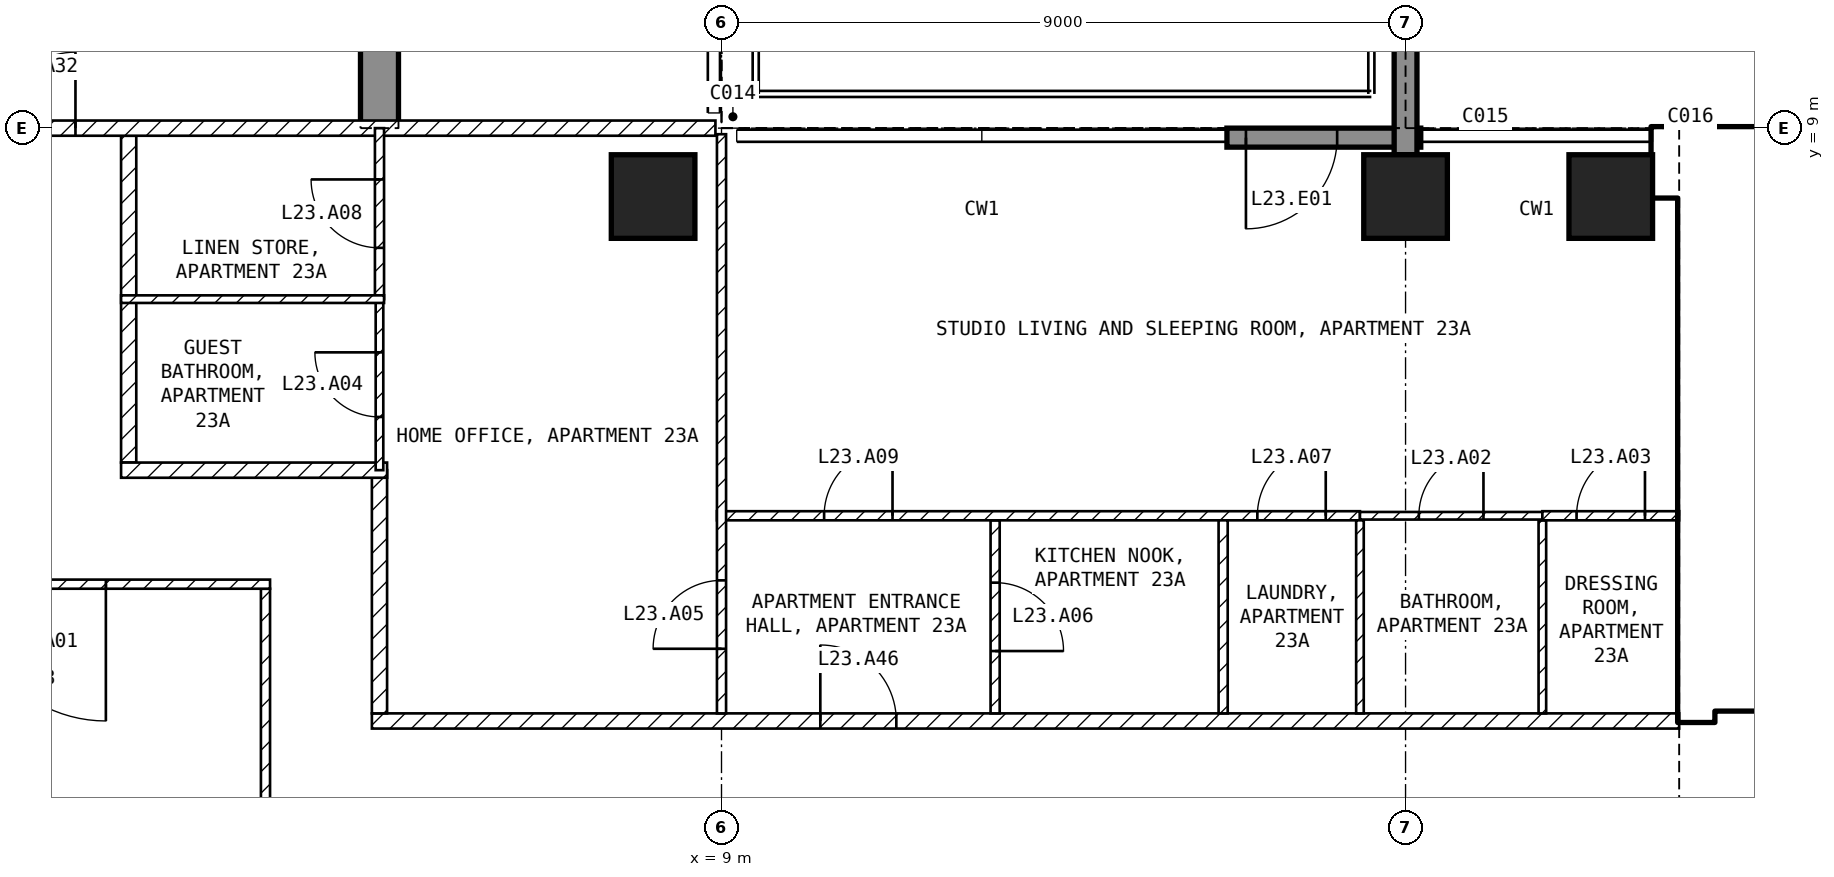
"""IFC4 building model, lengths in metres.
Left out: names, types, materials, properties, quantities, classifications, styles, units other than length and angle.
Written with IfcOpenShell. Run it as: python <this file> out.ifc"""

import sys

from ifc_helpers import new_model, si_unit, direction, frame, frame_2d, origin, origin_2d, place, context, subcontext, project, spatial, polyline, rectangle, outline, extrude, element, fill, save


model = new_model("IFC4")
c1 = context("Model", 3, precision=1e-05, world=origin(), true_north=direction((0.0, 1.0)))
c2 = subcontext(c1, "Body", "Model", "MODEL_VIEW")
j1 = project(units=[si_unit("LENGTHUNIT", "METRE"), si_unit("PLANEANGLEUNIT", "RADIAN")], contexts=[c1])
p1 = place(None, origin())
s1 = spatial("IfcSite", under=j1, at=p1, CompositionType="ELEMENT")
p2 = place(p1, origin())
s2 = spatial("IfcBuilding", under=s1, at=p2, CompositionType="ELEMENT")
p3 = place(p2, frame((0.0, 0.0, 102.4)))
s3 = spatial("IfcBuildingStorey", under=s2, at=p3, CompositionType="ELEMENT", Elevation=102.4)
for number, where, z_axis, x_axis in (
    (1, (8.1, 8.1, -0.25), (0.0, 0.0, 1.0), (1.0, 0.0, 0.0)),
    (2, (18.0, 8.1, -0.25), (0.0, 0.0, 1.0), (1.0, 0.0, 0.0)),
    (3, (20.7, 8.1, -0.25), (0.0, 0.0, 1.0), (1.0, 0.0, 0.0)),
):
    element("IfcColumn", number, at=place(p3, frame(where, z_axis=z_axis, x_axis=x_axis)), inside=s3, PredefinedType="COLUMN", context=c2, shape_type="SweptSolid", body=[
        extrude(rectangle(XDim=1.1, YDim=1.1, at=origin_2d()), origin(), (0.0, 0.0, 1.0), 3.5),
    ])
p4 = place(p3, frame((4.25, 9.0, -0.25), z_axis=(1.0, 0.0, 0.0), x_axis=(0.0, 1.0, 0.0)))
e4 = element("IfcWall", 4, at=p4, inside=s3, PredefinedType="SHEAR", context=c2, shape_type="SweptSolid", body=[
    extrude(outline(polyline([(0.0, 0.0), (2.1, 0.0), (2.1, 2.65), (4.5, 2.65), (4.5, 0.0), (9.9, 0.0), (9.9, 2.65), (12.3, 2.65), (12.3, 0.0), (16.55, 0.0), (16.55, 3.5), (0.0, 3.5), (0.0, 0.0)])), origin(), (0.0, 0.0, 1.0), 0.5),
])
p5 = place(p3, frame((18.2, 8.875, 0.0), z_axis=(0.0, 0.0, 1.0), x_axis=(-1.0, 0.0, 0.0)))
e5 = element("IfcWall", 5, at=p5, inside=s3, PredefinedType="SOLIDWALL", context=c2, shape_type="SweptSolid", body=[
    extrude(rectangle(XDim=2.55, YDim=0.25, at=frame_2d((1.275, 0.0))), origin(), (0.0, 0.0, 1.0), 3.25),
])
p6 = place(p5, frame((1.1, 0.0, 0.0)))
e6 = element("IfcOpeningElement", 6, at=p6, cuts=e5, PredefinedType="OPENING", context=c2, shape_type="SweptSolid", body=[
    extrude(rectangle(XDim=1.2, YDim=2.4, at=frame_2d((0.6, 1.2))), frame((0.0, 0.135, 0.0), z_axis=(0.0, -1.0, 0.0), x_axis=(1.0, 0.0, 0.0)), (0.0, 0.0, 1.0), 0.27),
])
p7 = place(p3, frame((18.0, 8.65, 0.0), z_axis=(0.0, 0.0, 1.0), x_axis=(0.0, 1.0, 0.0)))
e7 = element("IfcWall", 7, at=p7, inside=s3, PredefinedType="SOLIDWALL", context=c2, shape_type="SweptSolid", body=[
    extrude(rectangle(XDim=3.09, YDim=0.3, at=frame_2d((1.545, 0.0))), origin(), (0.0, 0.0, 1.0), 3.25),
])
p8 = place(p3, frame((21.25, 8.55, 0.0), z_axis=(0.0, 0.0, 1.0), x_axis=(1.0, 0.0, 0.0)))
e8 = element("IfcWall", 8, at=p8, inside=s3, PredefinedType="SHEAR", context=c2, shape_type="SweptSolid", body=[
    extrude(rectangle(XDim=8.2, YDim=0.9, at=frame_2d((4.1, 0.0))), origin(), (0.0, 0.0, 1.0), 3.25),
])
p9 = place(p3, frame((21.825, 1.2, 0.0), z_axis=(0.0, 0.0, 1.0), x_axis=(0.0, 1.0, 0.0)))
e9 = element("IfcWall", 9, at=p9, inside=s3, PredefinedType="SHEAR", context=c2, shape_type="SweptSolid", body=[
    extrude(rectangle(XDim=6.9, YDim=0.45, at=frame_2d((3.45, 0.0))), origin(), (0.0, 0.0, 1.0), 3.25),
])
p10 = place(p3, frame((22.05, 1.45, 0.0), z_axis=(0.0, 0.0, 1.0), x_axis=(1.0, 0.0, 0.0)))
e10 = element("IfcWall", 10, at=p10, inside=s3, PredefinedType="SOLIDWALL", context=c2, shape_type="SweptSolid", body=[
    extrude(rectangle(XDim=11.0, YDim=0.2, at=frame_2d((5.5, 0.0))), origin(), (0.0, 0.0, 1.0), 3.25),
])
p11 = place(p10, frame((0.75, 0.0, 0.0)))
e11 = element("IfcOpeningElement", 11, at=p11, cuts=e10, PredefinedType="OPENING", context=c2, shape_type="SweptSolid", body=[
    extrude(rectangle(XDim=1.0, YDim=2.1, at=frame_2d((0.5, 1.05))), frame((0.0, 0.11, 0.0), z_axis=(0.0, -1.0, 0.0), x_axis=(1.0, 0.0, 0.0)), (0.0, 0.0, 1.0), 0.22),
])
p12 = place(p10, frame((3.25, 0.0, 0.0)))
e12 = element("IfcOpeningElement", 12, at=p12, cuts=e10, PredefinedType="OPENING", context=c2, shape_type="SweptSolid", body=[
    extrude(rectangle(XDim=1.0, YDim=2.1, at=frame_2d((0.5, 1.05))), frame((0.0, 0.11, 0.0), z_axis=(0.0, -1.0, 0.0), x_axis=(1.0, 0.0, 0.0)), (0.0, 0.0, 1.0), 0.22),
])
p13 = place(p10, frame((9.075, 0.0, 0.0)))
e13 = element("IfcOpeningElement", 13, at=p13, cuts=e10, PredefinedType="OPENING", context=c2, shape_type="SweptSolid", body=[
    extrude(rectangle(XDim=0.9, YDim=2.1, at=frame_2d((0.45, 1.05))), frame((0.0, 0.11, 0.0), z_axis=(0.0, -1.0, 0.0), x_axis=(1.0, 0.0, 0.0)), (0.0, 0.0, 1.0), 0.22),
])
p14 = place(p3, frame((22.05, 5.15, 0.0), z_axis=(0.0, 0.0, 1.0), x_axis=(1.0, 0.0, 0.0)))
e14 = element("IfcWall", 14, at=p14, inside=s3, PredefinedType="SOLIDWALL", context=c2, shape_type="SweptSolid", body=[
    extrude(rectangle(XDim=6.3, YDim=0.2, at=frame_2d((3.15, 0.0))), origin(), (0.0, 0.0, 1.0), 3.25),
])
p15 = place(p14, frame((0.2, 0.0, 0.0)))
e15 = element("IfcOpeningElement", 15, at=p15, cuts=e14, PredefinedType="OPENING", context=c2, shape_type="SweptSolid", body=[
    extrude(rectangle(XDim=1.0, YDim=2.1, at=frame_2d((0.5, 1.05))), frame((0.0, 0.11, 0.0), z_axis=(0.0, -1.0, 0.0), x_axis=(1.0, 0.0, 0.0)), (0.0, 0.0, 1.0), 0.22),
])
p16 = place(p3, frame((3.0, -2.94, 0.0), z_axis=(0.0, 0.0, 1.0), x_axis=(0.0, 1.0, 0.0)))
e16 = element("IfcWall", 16, at=p16, inside=s3, PredefinedType="PARTITIONING", context=c2, shape_type="SweptSolid", body=[
    extrude(rectangle(XDim=5.88, YDim=0.12, at=frame_2d((2.94, 0.0))), origin(), (0.0, 0.0, 1.0), 3.25),
])
p17 = place(p3, frame((3.06, 3.0, 0.0), z_axis=(0.0, 0.0, 1.0), x_axis=(-1.0, 0.0, 0.0)))
e17 = element("IfcWall", 17, at=p17, inside=s3, PredefinedType="PARTITIONING", context=c2, shape_type="SweptSolid", body=[
    extrude(rectangle(XDim=6.12, YDim=0.12, at=frame_2d((3.06, 0.0))), origin(), (0.0, 0.0, 1.0), 3.25),
])
p18 = place(p17, frame((2.16, 0.0, 0.0)))
e18 = element("IfcOpeningElement", 18, at=p18, cuts=e17, PredefinedType="OPENING", context=c2, shape_type="SweptSolid", body=[
    extrude(rectangle(XDim=1.8, YDim=2.1, at=frame_2d((0.9, 1.05))), frame((0.0, 0.07, 0.0), z_axis=(0.0, -1.0, 0.0), x_axis=(1.0, 0.0, 0.0)), (0.0, 0.0, 1.0), 0.14),
])
p19 = place(p3, frame((4.4, 1.2, 0.0), z_axis=(0.0, 0.0, 1.0), x_axis=(1.0, 0.0, 0.0)))
e19 = element("IfcWall", 19, at=p19, inside=s3, PredefinedType="PARTITIONING", context=c2, shape_type="SweptSolid", body=[
    extrude(rectangle(XDim=17.2, YDim=0.2, at=frame_2d((8.6, 0.0))), origin(), (0.0, 0.0, 1.0), 3.25),
])
p20 = place(p19, frame((5.9, 0.0, 0.0)))
e20 = element("IfcOpeningElement", 20, at=p20, cuts=e19, PredefinedType="OPENING", context=c2, shape_type="SweptSolid", body=[
    extrude(rectangle(XDim=1.0, YDim=2.1, at=frame_2d((0.5, 1.05))), frame((0.0, 0.11, 0.0), z_axis=(0.0, -1.0, 0.0), x_axis=(1.0, 0.0, 0.0)), (0.0, 0.0, 1.0), 0.22),
])
p21 = place(p3, frame((4.5, 4.5, 0.0), z_axis=(0.0, 0.0, 1.0), x_axis=(0.0, -1.0, 0.0)))
e21 = element("IfcWall", 21, at=p21, inside=s3, PredefinedType="PARTITIONING", context=c2, shape_type="SweptSolid", body=[
    extrude(rectangle(XDim=3.2, YDim=0.2, at=frame_2d((1.6, 0.0))), origin(), (0.0, 0.0, 1.0), 3.25),
])
p22 = place(p3, frame((1.2, 8.9, 0.0), z_axis=(0.0, 0.0, 1.0), x_axis=(0.0, -1.0, 0.0)))
e22 = element("IfcWall", 22, at=p22, inside=s3, PredefinedType="PARTITIONING", context=c2, shape_type="SweptSolid", body=[
    extrude(rectangle(XDim=4.3, YDim=0.2, at=frame_2d((2.15, 0.0))), origin(), (0.0, 0.0, 1.0), 3.25),
])
p23 = place(p3, frame((1.1, 4.5, 0.0), z_axis=(0.0, 0.0, 1.0), x_axis=(1.0, 0.0, 0.0)))
e23 = element("IfcWall", 23, at=p23, inside=s3, PredefinedType="PARTITIONING", context=c2, shape_type="SweptSolid", body=[
    extrude(rectangle(XDim=3.5, YDim=0.2, at=frame_2d((1.75, 0.0))), origin(), (0.0, 0.0, 1.0), 3.25),
])
p24 = place(p3, frame((-8.92, 9.0, 0.0), z_axis=(0.0, 0.0, 1.0), x_axis=(1.0, 0.0, 0.0)))
e24 = element("IfcWall", 24, at=p24, inside=s3, PredefinedType="PARTITIONING", context=c2, shape_type="SweptSolid", body=[
    extrude(rectangle(XDim=17.84, YDim=0.2, at=frame_2d((8.92, 0.0))), origin(), (0.0, 0.0, 1.0), 3.25),
])
p25 = place(p24, frame((8.42, 0.0, 0.0)))
e25 = element("IfcOpeningElement", 25, at=p25, cuts=e24, PredefinedType="OPENING", context=c2, shape_type="SweptSolid", body=[
    extrude(rectangle(XDim=1.0, YDim=2.1, at=frame_2d((0.5, 1.05))), frame((0.0, 0.11, 0.0), z_axis=(0.0, -1.0, 0.0), x_axis=(1.0, 0.0, 0.0)), (0.0, 0.0, 1.0), 0.22),
])
p26 = place(p3, frame((12.6, 3.84, 0.0), z_axis=(0.0, 0.0, 1.0), x_axis=(0.0, -1.0, 0.0)))
e26 = element("IfcWall", 26, at=p26, inside=s3, PredefinedType="PARTITIONING", context=c2, shape_type="SweptSolid", body=[
    extrude(rectangle(XDim=2.54, YDim=0.12, at=frame_2d((1.27, 0.0))), origin(), (0.0, 0.0, 1.0), 3.25),
])
p27 = place(p26, frame((0.82, 0.0, 0.0)))
e27 = element("IfcOpeningElement", 27, at=p27, cuts=e26, PredefinedType="OPENING", context=c2, shape_type="SweptSolid", body=[
    extrude(rectangle(XDim=0.9, YDim=2.1, at=frame_2d((0.45, 1.05))), frame((0.0, 0.07, 0.0), z_axis=(0.0, -1.0, 0.0), x_axis=(1.0, 0.0, 0.0)), (0.0, 0.0, 1.0), 0.14),
])
p28 = place(p3, frame((8.94, 3.9, 0.0), z_axis=(0.0, 0.0, 1.0), x_axis=(1.0, 0.0, 0.0)))
e28 = element("IfcWall", 28, at=p28, inside=s3, PredefinedType="PARTITIONING", context=c2, shape_type="SweptSolid", body=[
    extrude(rectangle(XDim=8.46, YDim=0.12, at=frame_2d((4.23, 0.0))), origin(), (0.0, 0.0, 1.0), 3.25),
])
p29 = place(p28, frame((7.11, 0.0, 0.0)))
e29 = element("IfcOpeningElement", 29, at=p29, cuts=e28, PredefinedType="OPENING", context=c2, shape_type="SweptSolid", body=[
    extrude(rectangle(XDim=0.9, YDim=2.1, at=frame_2d((0.45, 1.05))), frame((0.0, 0.07, 0.0), z_axis=(0.0, -1.0, 0.0), x_axis=(1.0, 0.0, 0.0)), (0.0, 0.0, 1.0), 0.14),
])
p30 = place(p28, frame((1.41, 0.0, 0.0)))
e30 = element("IfcOpeningElement", 30, at=p30, cuts=e28, PredefinedType="OPENING", context=c2, shape_type="SweptSolid", body=[
    extrude(rectangle(XDim=0.9, YDim=2.1, at=frame_2d((0.45, 1.05))), frame((0.0, 0.07, 0.0), z_axis=(0.0, -1.0, 0.0), x_axis=(1.0, 0.0, 0.0)), (0.0, 0.0, 1.0), 0.14),
])
p31 = place(p3, frame((9.0, 1.3, 0.0), z_axis=(0.0, 0.0, 1.0), x_axis=(0.0, 1.0, 0.0)))
e31 = element("IfcWall", 31, at=p31, inside=s3, PredefinedType="PARTITIONING", context=c2, shape_type="SweptSolid", body=[
    extrude(rectangle(XDim=7.62, YDim=0.12, at=frame_2d((3.81, 0.0))), origin(), (0.0, 0.0, 1.0), 3.25),
])
p32 = place(p31, frame((0.85, 0.0, 0.0)))
e32 = element("IfcOpeningElement", 32, at=p32, cuts=e31, PredefinedType="OPENING", context=c2, shape_type="SweptSolid", body=[
    extrude(rectangle(XDim=0.9, YDim=2.1, at=frame_2d((0.45, 1.05))), frame((0.0, 0.07, 0.0), z_axis=(0.0, -1.0, 0.0), x_axis=(1.0, 0.0, 0.0)), (0.0, 0.0, 1.0), 0.14),
])
p33 = place(p3, frame((15.6, 3.84, 0.0), z_axis=(0.0, 0.0, 1.0), x_axis=(0.0, -1.0, 0.0)))
e33 = element("IfcWall", 33, at=p33, inside=s3, PredefinedType="PARTITIONING", context=c2, shape_type="SweptSolid", body=[
    extrude(rectangle(XDim=2.54, YDim=0.12, at=frame_2d((1.27, 0.0))), origin(), (0.0, 0.0, 1.0), 3.25),
])
for number, where, z_axis, x_axis in (
    (34, (17.4, 3.84, 0.0), (0.0, 0.0, 1.0), (0.0, -1.0, 0.0)),
    (35, (19.8, 3.84, 0.0), (0.0, 0.0, 1.0), (0.0, -1.0, 0.0)),
):
    element("IfcWall", number, at=place(p3, frame(where, z_axis=z_axis, x_axis=x_axis)), inside=s3, PredefinedType="PARTITIONING", context=c2, shape_type="SweptSolid", body=[
        extrude(rectangle(XDim=2.54, YDim=0.1, at=frame_2d((1.27, 0.0))), origin(), (0.0, 0.0, 1.0), 3.25),
    ])
p34 = place(p3, frame((17.4, 3.9, 0.0), z_axis=(0.0, 0.0, 1.0), x_axis=(1.0, 0.0, 0.0)))
e36 = element("IfcWall", 36, at=p34, inside=s3, PredefinedType="PARTITIONING", context=c2, shape_type="SweptSolid", body=[
    extrude(rectangle(XDim=2.4, YDim=0.1, at=frame_2d((1.2, 0.0))), origin(), (0.0, 0.0, 1.0), 3.25),
])
p35 = place(p34, frame((0.775, 0.0, 0.0)))
e37 = element("IfcOpeningElement", 37, at=p35, cuts=e36, PredefinedType="OPENING", context=c2, shape_type="SweptSolid", body=[
    extrude(rectangle(XDim=0.85, YDim=2.1, at=frame_2d((0.425, 1.05))), frame((0.0, 0.06, 0.0), z_axis=(0.0, -1.0, 0.0), x_axis=(1.0, 0.0, 0.0)), (0.0, 0.0, 1.0), 0.12),
])
p36 = place(p3, frame((19.8, 3.9, 0.0), z_axis=(0.0, 0.0, 1.0), x_axis=(1.0, 0.0, 0.0)))
e38 = element("IfcWall", 38, at=p36, inside=s3, PredefinedType="PARTITIONING", context=c2, shape_type="SweptSolid", body=[
    extrude(rectangle(XDim=1.8, YDim=0.12, at=frame_2d((0.9, 0.0))), origin(), (0.0, 0.0, 1.0), 3.25),
])
p37 = place(p36, frame((0.45, 0.0, 0.0)))
e39 = element("IfcOpeningElement", 39, at=p37, cuts=e38, PredefinedType="OPENING", context=c2, shape_type="SweptSolid", body=[
    extrude(rectangle(XDim=0.9, YDim=2.1, at=frame_2d((0.45, 1.05))), frame((0.0, 0.07, 0.0), z_axis=(0.0, -1.0, 0.0), x_axis=(1.0, 0.0, 0.0)), (0.0, 0.0, 1.0), 0.14),
])
p38 = place(p3, frame((4.5, 4.5, 0.0), z_axis=(0.0, 0.0, 1.0), x_axis=(0.0, 1.0, 0.0)))
e40 = element("IfcWall", 40, at=p38, inside=s3, PredefinedType="PARTITIONING", context=c2, shape_type="SweptSolid", body=[
    extrude(rectangle(XDim=2.25, YDim=0.1, at=frame_2d((1.125, 0.0))), origin(), (0.0, 0.0, 1.0), 3.25),
])
p39 = place(p38, frame((0.7, 0.0, 0.0)))
e41 = element("IfcOpeningElement", 41, at=p39, cuts=e40, PredefinedType="OPENING", context=c2, shape_type="SweptSolid", body=[
    extrude(rectangle(XDim=0.85, YDim=2.1, at=frame_2d((0.425, 1.05))), frame((0.0, 0.06, 0.0), z_axis=(0.0, -1.0, 0.0), x_axis=(1.0, 0.0, 0.0)), (0.0, 0.0, 1.0), 0.12),
])
p40 = place(p3, frame((4.5, 6.75, 0.0), z_axis=(0.0, 0.0, 1.0), x_axis=(0.0, 1.0, 0.0)))
e42 = element("IfcWall", 42, at=p40, inside=s3, PredefinedType="PARTITIONING", context=c2, shape_type="SweptSolid", body=[
    extrude(rectangle(XDim=2.25, YDim=0.12, at=frame_2d((1.125, 0.0))), origin(), (0.0, 0.0, 1.0), 3.25),
])
p41 = place(p40, frame((0.675, 0.0, 0.0)))
e43 = element("IfcOpeningElement", 43, at=p41, cuts=e42, PredefinedType="OPENING", context=c2, shape_type="SweptSolid", body=[
    extrude(rectangle(XDim=0.9, YDim=2.1, at=frame_2d((0.45, 1.05))), frame((0.0, 0.07, 0.0), z_axis=(0.0, -1.0, 0.0), x_axis=(1.0, 0.0, 0.0)), (0.0, 0.0, 1.0), 0.14),
])
p42 = place(p3, frame((1.1, 6.75, 0.0), z_axis=(0.0, 0.0, 1.0), x_axis=(1.0, 0.0, 0.0)))
e44 = element("IfcWall", 44, at=p42, inside=s3, PredefinedType="PARTITIONING", context=c2, shape_type="SweptSolid", body=[
    extrude(rectangle(XDim=3.46, YDim=0.1, at=frame_2d((1.73, 0.0))), origin(), (0.0, 0.0, 1.0), 3.25),
])
p43 = place(p6, origin())
e45 = element("IfcDoor", 45, at=p43, inside=s3, OperationType="SINGLE_SWING_RIGHT", PredefinedType="DOOR", context=c2, shape_type="SweptSolid", body=[
    extrude(rectangle(XDim=1.2, YDim=2.4, at=frame_2d((0.6, 1.2))), frame((0.0, 0.025, 0.0), z_axis=(0.0, -1.0, 0.0), x_axis=(1.0, 0.0, 0.0)), (0.0, 0.0, 1.0), 0.05),
])
fill(e6, e45)
p44 = place(p15, origin())
e46 = element("IfcDoor", 46, at=p44, inside=s3, OperationType="SINGLE_SWING_LEFT", PredefinedType="DOOR", context=c2, shape_type="SweptSolid", body=[
    extrude(rectangle(XDim=1.0, YDim=2.1, at=frame_2d((0.5, 1.05))), frame((0.0, 0.025, 0.0), z_axis=(0.0, -1.0, 0.0), x_axis=(1.0, 0.0, 0.0)), (0.0, 0.0, 1.0), 0.05),
])
fill(e15, e46)
p45 = place(p18, origin())
e47 = element("IfcDoor", 47, at=p45, inside=s3, OperationType="SINGLE_SWING_LEFT", PredefinedType="DOOR", context=c2, shape_type="SweptSolid", body=[
    extrude(rectangle(XDim=1.8, YDim=2.1, at=frame_2d((0.9, 1.05))), frame((0.0, 0.025, 0.0), z_axis=(0.0, -1.0, 0.0), x_axis=(1.0, 0.0, 0.0)), (0.0, 0.0, 1.0), 0.05),
])
fill(e18, e47)
p46 = place(p35, origin())
e48 = element("IfcDoor", 48, at=p46, inside=s3, OperationType="SINGLE_SWING_RIGHT", PredefinedType="DOOR", context=c2, shape_type="SweptSolid", body=[
    extrude(rectangle(XDim=0.85, YDim=2.1, at=frame_2d((0.425, 1.05))), frame((0.0, 0.025, 0.0), z_axis=(0.0, -1.0, 0.0), x_axis=(1.0, 0.0, 0.0)), (0.0, 0.0, 1.0), 0.05),
])
fill(e37, e48)
p47 = place(p37, origin())
e49 = element("IfcDoor", 49, at=p47, inside=s3, OperationType="SINGLE_SWING_RIGHT", PredefinedType="DOOR", context=c2, shape_type="SweptSolid", body=[
    extrude(rectangle(XDim=0.9, YDim=2.1, at=frame_2d((0.45, 1.05))), frame((0.0, 0.025, 0.0), z_axis=(0.0, -1.0, 0.0), x_axis=(1.0, 0.0, 0.0)), (0.0, 0.0, 1.0), 0.05),
])
fill(e39, e49)
p48 = place(p39, origin())
e50 = element("IfcDoor", 50, at=p48, inside=s3, OperationType="SINGLE_SWING_RIGHT", PredefinedType="DOOR", context=c2, shape_type="SweptSolid", body=[
    extrude(rectangle(XDim=0.85, YDim=2.1, at=frame_2d((0.425, 1.05))), frame((0.0, 0.025, 0.0), z_axis=(0.0, -1.0, 0.0), x_axis=(1.0, 0.0, 0.0)), (0.0, 0.0, 1.0), 0.05),
])
fill(e41, e50)
p49 = place(p32, origin())
e51 = element("IfcDoor", 51, at=p49, inside=s3, OperationType="SINGLE_SWING_LEFT", PredefinedType="DOOR", context=c2, shape_type="SweptSolid", body=[
    extrude(rectangle(XDim=0.9, YDim=2.1, at=frame_2d((0.45, 1.05))), frame((0.0, 0.025, 0.0), z_axis=(0.0, -1.0, 0.0), x_axis=(1.0, 0.0, 0.0)), (0.0, 0.0, 1.0), 0.05),
])
fill(e32, e51)
p50 = place(p27, origin())
e52 = element("IfcDoor", 52, at=p50, inside=s3, OperationType="SINGLE_SWING_RIGHT", PredefinedType="DOOR", context=c2, shape_type="SweptSolid", body=[
    extrude(rectangle(XDim=0.9, YDim=2.1, at=frame_2d((0.45, 1.05))), frame((0.0, 0.025, 0.0), z_axis=(0.0, -1.0, 0.0), x_axis=(1.0, 0.0, 0.0)), (0.0, 0.0, 1.0), 0.05),
])
fill(e27, e52)
p51 = place(p29, origin())
e53 = element("IfcDoor", 53, at=p51, inside=s3, OperationType="SINGLE_SWING_RIGHT", PredefinedType="DOOR", context=c2, shape_type="SweptSolid", body=[
    extrude(rectangle(XDim=0.9, YDim=2.1, at=frame_2d((0.45, 1.05))), frame((0.0, 0.025, 0.0), z_axis=(0.0, -1.0, 0.0), x_axis=(1.0, 0.0, 0.0)), (0.0, 0.0, 1.0), 0.05),
])
fill(e29, e53)
p52 = place(p41, origin())
e54 = element("IfcDoor", 54, at=p52, inside=s3, OperationType="SINGLE_SWING_RIGHT", PredefinedType="DOOR", context=c2, shape_type="SweptSolid", body=[
    extrude(rectangle(XDim=0.9, YDim=2.1, at=frame_2d((0.45, 1.05))), frame((0.0, 0.025, 0.0), z_axis=(0.0, -1.0, 0.0), x_axis=(1.0, 0.0, 0.0)), (0.0, 0.0, 1.0), 0.05),
])
fill(e43, e54)
p53 = place(p30, origin())
e55 = element("IfcDoor", 55, at=p53, inside=s3, OperationType="SINGLE_SWING_RIGHT", PredefinedType="DOOR", context=c2, shape_type="SweptSolid", body=[
    extrude(rectangle(XDim=0.9, YDim=2.1, at=frame_2d((0.45, 1.05))), frame((0.0, 0.025, 0.0), z_axis=(0.0, -1.0, 0.0), x_axis=(1.0, 0.0, 0.0)), (0.0, 0.0, 1.0), 0.05),
])
fill(e30, e55)
p54 = place(p25, origin())
e56 = element("IfcDoor", 56, at=p54, inside=s3, OperationType="SINGLE_SWING_RIGHT", PredefinedType="DOOR", context=c2, shape_type="SweptSolid", body=[
    extrude(rectangle(XDim=1.0, YDim=2.1, at=frame_2d((0.5, 1.05))), frame((0.0, 0.025, 0.0), z_axis=(0.0, -1.0, 0.0), x_axis=(1.0, 0.0, 0.0)), (0.0, 0.0, 1.0), 0.05),
])
fill(e25, e56)
p55 = place(p20, origin())
e57 = element("IfcDoor", 57, at=p55, inside=s3, OperationType="SINGLE_SWING_LEFT", PredefinedType="DOOR", context=c2, shape_type="SweptSolid", body=[
    extrude(rectangle(XDim=1.0, YDim=2.1, at=frame_2d((0.5, 1.05))), frame((0.0, 0.025, 0.0), z_axis=(0.0, -1.0, 0.0), x_axis=(1.0, 0.0, 0.0)), (0.0, 0.0, 1.0), 0.05),
])
fill(e20, e57)
save(model, sys.argv[1])
